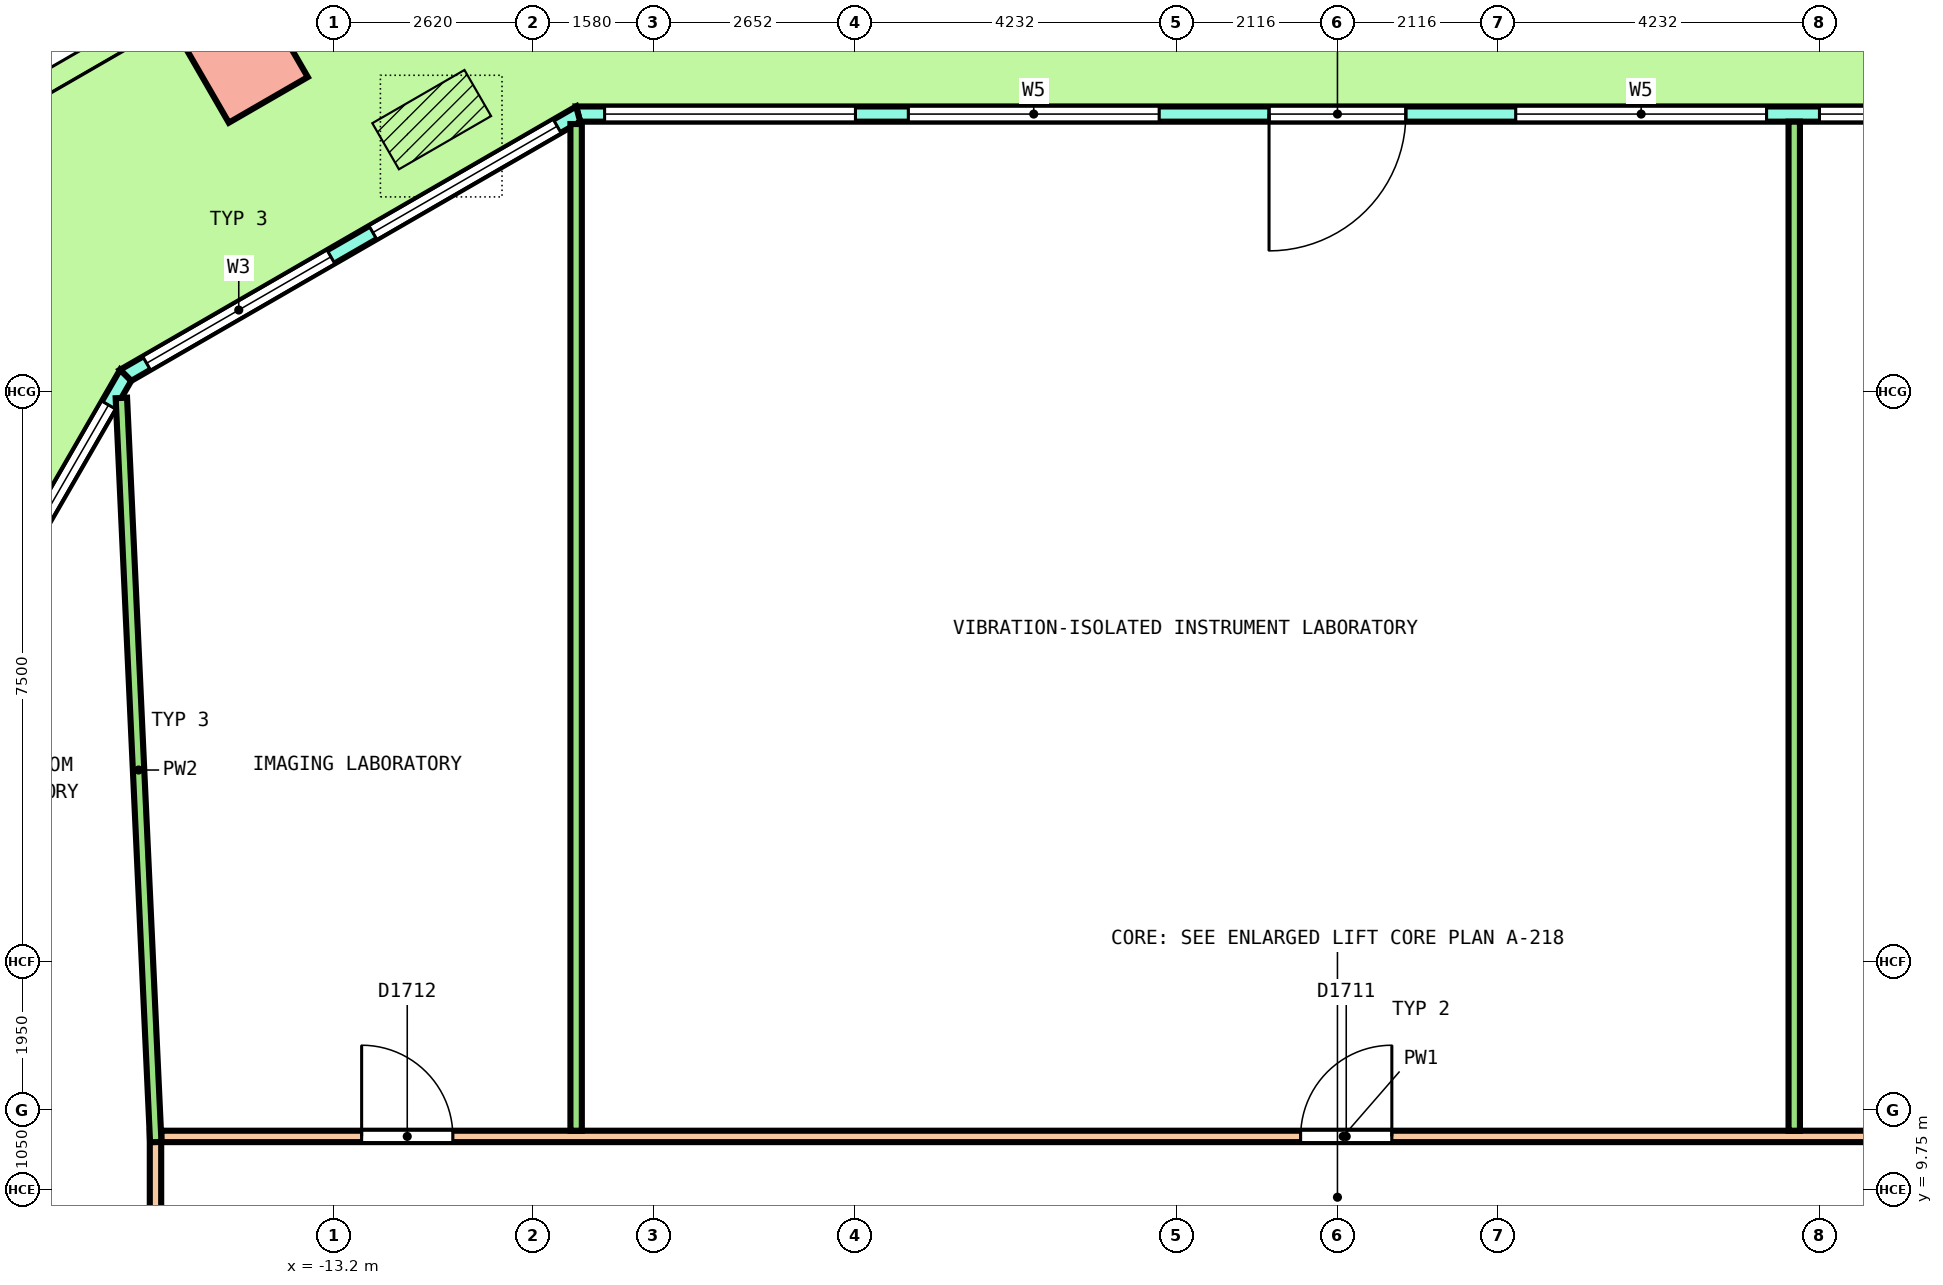
"""IFC4 building model, lengths in metres.
Left out: names, types, materials, properties, quantities, classifications, styles, units other than length and angle.
Written with IfcOpenShell. Run it as: python <this file> out.ifc"""

import sys

from ifc_helpers import new_model, si_unit, direction, frame, frame_2d, origin, origin_2d, place, context, subcontext, project, spatial, polyline, rectangle, outline, extrude, element, fill, save


model = new_model("IFC4")
c1 = context("Model", 3, precision=1e-05, world=origin(), true_north=direction((0.0, 1.0)))
c2 = subcontext(c1, "Body", "Model", "MODEL_VIEW")
j1 = project(units=[si_unit("LENGTHUNIT", "METRE"), si_unit("PLANEANGLEUNIT", "RADIAN")], contexts=[c1])
p1 = place(None, origin())
s1 = spatial("IfcSite", under=j1, at=p1, CompositionType="ELEMENT")
p2 = place(p1, origin())
s2 = spatial("IfcBuilding", under=s1, at=p2, CompositionType="ELEMENT")
p3 = place(p2, frame((0.0, 0.0, 149.6)))
s3 = spatial("IfcBuildingStorey", under=s2, at=p3, CompositionType="ELEMENT", Elevation=149.6)
p4 = place(p3, frame((-14.366, 24.606, 0.0), z_axis=(-0.036207253783, 0.0, 0.999344302417), x_axis=(-0.865315366935, -0.500246354177, -0.031351250032)))
e1 = element("IfcColumn", 1, at=p4, inside=s3, PredefinedType="COLUMN", context=c2, shape_type="SweptSolid", body=[
    extrude(rectangle(XDim=1.2, YDim=1.2, at=origin_2d()), origin(), (0.0, 0.0, 1.0), 4.052),
])
p5 = place(p3, frame((9.989, 23.9, 0.0), z_axis=(0.0, 0.0, 1.0), x_axis=(-1.0, 0.0, 0.0)))
e2 = element("IfcWall", 2, at=p5, inside=s3, PredefinedType="SOLIDWALL", context=c2, shape_type="SweptSolid", body=[
    extrude(outline(polyline([(-0.027, -0.1), (1.028, -0.1), (2.082, -0.1), (3.136, -0.1), (4.19, -0.1), (5.245, -0.1), (6.299, -0.1), (7.354, -0.1), (8.408, -0.1), (9.462, -0.1), (10.516, -0.1), (11.571, -0.1), (12.625, -0.1), (13.679, -0.1), (14.734, -0.1), (15.788, -0.1), (16.842, -0.1), (17.897, -0.1), (18.951, -0.1), (20.005, -0.1), (19.952, 0.1), (18.903, 0.1), (17.854, 0.1), (16.806, 0.1), (15.757, 0.1), (14.708, 0.1), (13.66, 0.1), (12.611, 0.1), (11.562, 0.1), (10.514, 0.1), (9.465, 0.1), (8.416, 0.1), (7.368, 0.1), (6.319, 0.1), (5.27, 0.1), (4.221, 0.1), (3.173, 0.1), (2.124, 0.1), (1.075, 0.1), (0.027, 0.1), (-0.027, -0.1)])), origin(), (0.0, 0.0, 1.0), 4.1),
])
p6 = place(p5, frame((0.348, 0.0, 0.1)))
e3 = element("IfcOpeningElement", 3, at=p6, cuts=e2, PredefinedType="OPENING", context=c2, shape_type="SweptSolid", body=[
    extrude(rectangle(XDim=3.3, YDim=2.9, at=frame_2d((1.65, 1.45))), frame((0.0, 0.11, 0.0), z_axis=(0.0, -1.0, 0.0), x_axis=(1.0, 0.0, 0.0)), (0.0, 0.0, 1.0), 0.22),
])
p7 = place(p5, frame((4.344, 0.0, 0.1)))
e4 = element("IfcOpeningElement", 4, at=p7, cuts=e2, PredefinedType="OPENING", context=c2, shape_type="SweptSolid", body=[
    extrude(rectangle(XDim=3.3, YDim=2.9, at=frame_2d((1.65, 1.45))), frame((0.0, 0.11, 0.0), z_axis=(0.0, -1.0, 0.0), x_axis=(1.0, 0.0, 0.0)), (0.0, 0.0, 1.0), 0.22),
])
p8 = place(p5, frame((9.089, 0.0, 0.0)))
e5 = element("IfcOpeningElement", 5, at=p8, cuts=e2, PredefinedType="OPENING", context=c2, shape_type="SweptSolid", body=[
    extrude(rectangle(XDim=1.8, YDim=2.4, at=frame_2d((0.9, 1.2))), frame((0.0, 0.11, 0.0), z_axis=(0.0, -1.0, 0.0), x_axis=(1.0, 0.0, 0.0)), (0.0, 0.0, 1.0), 0.22),
])
p9 = place(p5, frame((9.089, 0.0, 2.55)))
e6 = element("IfcOpeningElement", 6, at=p9, cuts=e2, PredefinedType="OPENING", context=c2, shape_type="SweptSolid", body=[
    extrude(rectangle(XDim=1.8, YDim=0.45, at=frame_2d((0.9, 0.225))), frame((0.0, 0.11, 0.0), z_axis=(0.0, -1.0, 0.0), x_axis=(1.0, 0.0, 0.0)), (0.0, 0.0, 1.0), 0.22),
])
p10 = place(p5, frame((12.335, 0.0, 0.1)))
e7 = element("IfcOpeningElement", 7, at=p10, cuts=e2, PredefinedType="OPENING", context=c2, shape_type="SweptSolid", body=[
    extrude(rectangle(XDim=3.3, YDim=2.9, at=frame_2d((1.65, 1.45))), frame((0.0, 0.11, 0.0), z_axis=(0.0, -1.0, 0.0), x_axis=(1.0, 0.0, 0.0)), (0.0, 0.0, 1.0), 0.22),
])
p11 = place(p5, frame((16.331, 0.0, 0.1)))
e8 = element("IfcOpeningElement", 8, at=p11, cuts=e2, PredefinedType="OPENING", context=c2, shape_type="SweptSolid", body=[
    extrude(rectangle(XDim=3.3, YDim=2.9, at=frame_2d((1.65, 1.45))), frame((0.0, 0.11, 0.0), z_axis=(0.0, -1.0, 0.0), x_axis=(1.0, 0.0, 0.0)), (0.0, 0.0, 1.0), 0.22),
])
p12 = place(p3, frame((-9.989, 23.9, 0.0), z_axis=(0.0, 0.0, 1.0), x_axis=(-0.866029458321, -0.49999297727, 0.0)))
e9 = element("IfcWall", 9, at=p12, inside=s3, PredefinedType="SOLIDWALL", context=c2, shape_type="SweptSolid", body=[
    extrude(outline(polyline([(-0.027, -0.1), (1.128, -0.1), (2.282, -0.1), (3.437, -0.1), (4.592, -0.1), (5.747, -0.1), (6.901, -0.1), (6.848, 0.1), (5.711, 0.1), (4.574, 0.1), (3.437, 0.1), (2.301, 0.1), (1.164, 0.1), (0.027, 0.1), (-0.027, -0.1)])), origin(), (0.0, 0.0, 1.0), 4.1),
])
p13 = place(p12, frame((0.319, 0.0, 0.1)))
e10 = element("IfcOpeningElement", 10, at=p13, cuts=e9, PredefinedType="OPENING", context=c2, shape_type="SweptSolid", body=[
    extrude(rectangle(XDim=2.8, YDim=2.9, at=frame_2d((1.4, 1.45))), frame((0.0, 0.11, 0.0), z_axis=(0.0, -1.0, 0.0), x_axis=(1.0, 0.0, 0.0)), (0.0, 0.0, 1.0), 0.22),
])
p14 = place(p12, frame((3.756, 0.0, 0.1)))
e11 = element("IfcOpeningElement", 11, at=p14, cuts=e9, PredefinedType="OPENING", context=c2, shape_type="SweptSolid", body=[
    extrude(rectangle(XDim=2.8, YDim=2.9, at=frame_2d((1.4, 1.45))), frame((0.0, 0.11, 0.0), z_axis=(0.0, -1.0, 0.0), x_axis=(1.0, 0.0, 0.0)), (0.0, 0.0, 1.0), 0.22),
])
p15 = place(p3, frame((-15.943, 20.463, 0.0), z_axis=(0.0, 0.0, 1.0), x_axis=(-0.500002434251, -0.866023998365, 0.0)))
e12 = element("IfcWall", 12, at=p15, inside=s3, PredefinedType="SOLIDWALL", context=c2, shape_type="SweptSolid", body=[
    extrude(outline(polyline([(-0.027, -0.1), (1.002, -0.1), (2.031, -0.1), (3.061, -0.1), (4.09, -0.1), (5.119, -0.1), (6.148, -0.1), (7.177, -0.1), (8.206, -0.1), (9.235, -0.1), (10.264, -0.1), (11.293, -0.1), (12.323, -0.1), (13.352, -0.1), (14.381, -0.1), (15.41, -0.1), (16.439, -0.1), (17.468, -0.1), (18.497, -0.1), (19.526, -0.1), (19.473, 0.1), (18.449, 0.1), (17.426, 0.1), (16.402, 0.1), (15.379, 0.1), (14.355, 0.1), (13.332, 0.1), (12.308, 0.1), (11.285, 0.1), (10.261, 0.1), (9.238, 0.1), (8.215, 0.1), (7.191, 0.1), (6.168, 0.1), (5.144, 0.1), (4.121, 0.1), (3.097, 0.1), (2.074, 0.1), (1.05, 0.1), (0.027, 0.1), (-0.027, -0.1)])), origin(), (0.0, 0.0, 1.0), 4.1),
])
p16 = place(p15, frame((0.45, 0.0, 0.1)))
e13 = element("IfcOpeningElement", 13, at=p16, cuts=e12, PredefinedType="OPENING", context=c2, shape_type="SweptSolid", body=[
    extrude(rectangle(XDim=3.0, YDim=2.9, at=frame_2d((1.5, 1.45))), frame((0.0, 0.11, 0.0), z_axis=(0.0, -1.0, 0.0), x_axis=(1.0, 0.0, 0.0)), (0.0, 0.0, 1.0), 0.22),
])
p17 = place(p15, frame((4.35, 0.0, 0.1)))
e14 = element("IfcOpeningElement", 14, at=p17, cuts=e12, PredefinedType="OPENING", context=c2, shape_type="SweptSolid", body=[
    extrude(rectangle(XDim=3.0, YDim=2.9, at=frame_2d((1.5, 1.45))), frame((0.0, 0.11, 0.0), z_axis=(0.0, -1.0, 0.0), x_axis=(1.0, 0.0, 0.0)), (0.0, 0.0, 1.0), 0.22),
])
p18 = place(p15, frame((8.85, 0.0, 0.0)))
e15 = element("IfcOpeningElement", 15, at=p18, cuts=e12, PredefinedType="OPENING", context=c2, shape_type="SweptSolid", body=[
    extrude(rectangle(XDim=1.8, YDim=2.4, at=frame_2d((0.9, 1.2))), frame((0.0, 0.11, 0.0), z_axis=(0.0, -1.0, 0.0), x_axis=(1.0, 0.0, 0.0)), (0.0, 0.0, 1.0), 0.22),
])
p19 = place(p15, frame((8.85, 0.0, 2.55)))
e16 = element("IfcOpeningElement", 16, at=p19, cuts=e12, PredefinedType="OPENING", context=c2, shape_type="SweptSolid", body=[
    extrude(rectangle(XDim=1.8, YDim=0.45, at=frame_2d((0.9, 0.225))), frame((0.0, 0.11, 0.0), z_axis=(0.0, -1.0, 0.0), x_axis=(1.0, 0.0, 0.0)), (0.0, 0.0, 1.0), 0.22),
])
p20 = place(p15, frame((12.15, 0.0, 0.1)))
e17 = element("IfcOpeningElement", 17, at=p20, cuts=e12, PredefinedType="OPENING", context=c2, shape_type="SweptSolid", body=[
    extrude(rectangle(XDim=3.0, YDim=2.9, at=frame_2d((1.5, 1.45))), frame((0.0, 0.11, 0.0), z_axis=(0.0, -1.0, 0.0), x_axis=(1.0, 0.0, 0.0)), (0.0, 0.0, 1.0), 0.22),
])
p21 = place(p15, frame((16.05, 0.0, 0.1)))
e18 = element("IfcOpeningElement", 18, at=p21, cuts=e12, PredefinedType="OPENING", context=c2, shape_type="SweptSolid", body=[
    extrude(rectangle(XDim=3.0, YDim=2.9, at=frame_2d((1.5, 1.45))), frame((0.0, 0.11, 0.0), z_axis=(0.0, -1.0, 0.0), x_axis=(1.0, 0.0, 0.0)), (0.0, 0.0, 1.0), 0.22),
])
p22 = place(p3, frame((-15.475, 10.45, 0.0), z_axis=(0.0, 0.0, 1.0), x_axis=(1.0, 0.0, 0.0)))
e19 = element("IfcWall", 19, at=p22, inside=s3, PredefinedType="PARTITIONING", context=c2, shape_type="SweptSolid", body=[
    extrude(rectangle(XDim=31.1, YDim=0.15, at=frame_2d((15.55, 0.0))), origin(), (0.0, 0.0, 1.0), 3.05),
])
p23 = place(p22, frame((25.665, 0.0, 0.0)))
e20 = element("IfcOpeningElement", 20, at=p23, cuts=e19, PredefinedType="OPENING", context=c2, shape_type="SweptSolid", body=[
    extrude(rectangle(XDim=1.2, YDim=2.1, at=frame_2d((0.6, 1.05))), frame((0.0, 0.085, 0.0), z_axis=(0.0, -1.0, 0.0), x_axis=(1.0, 0.0, 0.0)), (0.0, 0.0, 1.0), 0.17),
])
p24 = place(p22, frame((14.99, 0.0, 0.0)))
e21 = element("IfcOpeningElement", 21, at=p24, cuts=e19, PredefinedType="OPENING", context=c2, shape_type="SweptSolid", body=[
    extrude(rectangle(XDim=1.2, YDim=2.1, at=frame_2d((0.6, 1.05))), frame((0.0, 0.085, 0.0), z_axis=(0.0, -1.0, 0.0), x_axis=(1.0, 0.0, 0.0)), (0.0, 0.0, 1.0), 0.17),
])
p25 = place(p22, frame((2.637, 0.0, 0.0)))
e22 = element("IfcOpeningElement", 22, at=p25, cuts=e19, PredefinedType="OPENING", context=c2, shape_type="SweptSolid", body=[
    extrude(rectangle(XDim=1.2, YDim=2.1, at=frame_2d((0.6, 1.05))), frame((0.0, 0.085, 0.0), z_axis=(0.0, -1.0, 0.0), x_axis=(1.0, 0.0, 0.0)), (0.0, 0.0, 1.0), 0.17),
])
p26 = place(p3, frame((-15.55, -0.669, 0.0), z_axis=(0.0, 0.0, 1.0), x_axis=(0.0, 1.0, 0.0)))
e23 = element("IfcWall", 23, at=p26, inside=s3, PredefinedType="PARTITIONING", context=c2, shape_type="SweptSolid", body=[
    extrude(rectangle(XDim=11.194, YDim=0.15, at=frame_2d((5.597, 0.0))), origin(), (0.0, 0.0, 1.0), 3.05),
])
p27 = place(p26, frame((7.095, 0.0, 0.0)))
e24 = element("IfcOpeningElement", 24, at=p27, cuts=e23, PredefinedType="OPENING", context=c2, shape_type="SweptSolid", body=[
    extrude(rectangle(XDim=1.2, YDim=2.1, at=frame_2d((0.6, 1.05))), frame((0.0, 0.085, 0.0), z_axis=(0.0, -1.0, 0.0), x_axis=(1.0, 0.0, 0.0)), (0.0, 0.0, 1.0), 0.17),
])
p28 = place(p3, frame((6.01, 10.525, 0.0), z_axis=(0.0, 0.0, 1.0), x_axis=(0.0, 1.0, 0.0)))
e25 = element("IfcWall", 25, at=p28, inside=s3, PredefinedType="PARTITIONING", context=c2, shape_type="SweptSolid", body=[
    extrude(rectangle(XDim=13.275, YDim=0.15, at=frame_2d((6.638, 0.0))), origin(), (0.0, 0.0, 1.0), 3.05),
])
p29 = place(p3, frame((-10.016, 10.525, 0.0), z_axis=(0.0, 0.0, 1.0), x_axis=(0.0, 1.0, 0.0)))
e26 = element("IfcWall", 26, at=p29, inside=s3, PredefinedType="PARTITIONING", context=c2, shape_type="SweptSolid", body=[
    extrude(rectangle(XDim=13.244, YDim=0.15, at=frame_2d((6.622, 0.0))), origin(), (0.0, 0.0, 1.0), 3.05),
])
p30 = place(p3, frame((-15.999, 20.166, 0.0), z_axis=(0.0, 0.0, 1.0), x_axis=(0.046182778753, -0.998933006235, 0.0)))
e27 = element("IfcWall", 27, at=p30, inside=s3, PredefinedType="PARTITIONING", context=c2, shape_type="SweptSolid", body=[
    extrude(rectangle(XDim=9.801, YDim=0.15, at=frame_2d((4.9, 0.0))), origin(), (0.0, 0.0, 1.0), 3.05),
])
p31 = place(p6, origin())
e28 = element("IfcWindow", 28, at=p31, inside=s3, PartitioningType="SINGLE_PANEL", PredefinedType="WINDOW", context=c2, shape_type="SweptSolid", body=[
    extrude(rectangle(XDim=3.3, YDim=2.9, at=frame_2d((1.65, 1.45))), frame((0.0, 0.03, 0.0), z_axis=(0.0, -1.0, 0.0), x_axis=(1.0, 0.0, 0.0)), (0.0, 0.0, 1.0), 0.06),
])
fill(e3, e28)
p32 = place(p7, origin())
e29 = element("IfcWindow", 29, at=p32, inside=s3, PartitioningType="SINGLE_PANEL", PredefinedType="WINDOW", context=c2, shape_type="SweptSolid", body=[
    extrude(rectangle(XDim=3.3, YDim=2.9, at=frame_2d((1.65, 1.45))), frame((0.0, 0.03, 0.0), z_axis=(0.0, -1.0, 0.0), x_axis=(1.0, 0.0, 0.0)), (0.0, 0.0, 1.0), 0.06),
])
fill(e4, e29)
p33 = place(p8, origin())
e30 = element("IfcDoor", 30, at=p33, inside=s3, OperationType="DOUBLE_DOOR_SINGLE_SWING", PredefinedType="DOOR", context=c2, shape_type="SweptSolid", body=[
    extrude(rectangle(XDim=1.8, YDim=2.4, at=frame_2d((0.9, 1.2))), frame((0.0, 0.025, 0.0), z_axis=(0.0, -1.0, 0.0), x_axis=(1.0, 0.0, 0.0)), (0.0, 0.0, 1.0), 0.05),
])
fill(e5, e30)
p34 = place(p9, origin())
e31 = element("IfcWindow", 31, at=p34, inside=s3, PartitioningType="SINGLE_PANEL", PredefinedType="WINDOW", context=c2, shape_type="SweptSolid", body=[
    extrude(rectangle(XDim=1.8, YDim=0.45, at=frame_2d((0.9, 0.225))), frame((0.0, 0.03, 0.0), z_axis=(0.0, -1.0, 0.0), x_axis=(1.0, 0.0, 0.0)), (0.0, 0.0, 1.0), 0.06),
])
fill(e6, e31)
p35 = place(p10, origin())
e32 = element("IfcWindow", 32, at=p35, inside=s3, PartitioningType="SINGLE_PANEL", PredefinedType="WINDOW", context=c2, shape_type="SweptSolid", body=[
    extrude(rectangle(XDim=3.3, YDim=2.9, at=frame_2d((1.65, 1.45))), frame((0.0, 0.03, 0.0), z_axis=(0.0, -1.0, 0.0), x_axis=(1.0, 0.0, 0.0)), (0.0, 0.0, 1.0), 0.06),
])
fill(e7, e32)
p36 = place(p11, origin())
e33 = element("IfcWindow", 33, at=p36, inside=s3, PartitioningType="SINGLE_PANEL", PredefinedType="WINDOW", context=c2, shape_type="SweptSolid", body=[
    extrude(rectangle(XDim=3.3, YDim=2.9, at=frame_2d((1.65, 1.45))), frame((0.0, 0.03, 0.0), z_axis=(0.0, -1.0, 0.0), x_axis=(1.0, 0.0, 0.0)), (0.0, 0.0, 1.0), 0.06),
])
fill(e8, e33)
p37 = place(p13, origin())
e34 = element("IfcWindow", 34, at=p37, inside=s3, PartitioningType="SINGLE_PANEL", PredefinedType="WINDOW", context=c2, shape_type="SweptSolid", body=[
    extrude(rectangle(XDim=2.8, YDim=2.9, at=frame_2d((1.4, 1.45))), frame((0.0, 0.03, 0.0), z_axis=(0.0, -1.0, 0.0), x_axis=(1.0, 0.0, 0.0)), (0.0, 0.0, 1.0), 0.06),
])
fill(e10, e34)
p38 = place(p14, origin())
e35 = element("IfcWindow", 35, at=p38, inside=s3, PartitioningType="SINGLE_PANEL", PredefinedType="WINDOW", context=c2, shape_type="SweptSolid", body=[
    extrude(rectangle(XDim=2.8, YDim=2.9, at=frame_2d((1.4, 1.45))), frame((0.0, 0.03, 0.0), z_axis=(0.0, -1.0, 0.0), x_axis=(1.0, 0.0, 0.0)), (0.0, 0.0, 1.0), 0.06),
])
fill(e11, e35)
p39 = place(p16, origin())
e36 = element("IfcWindow", 36, at=p39, inside=s3, PartitioningType="SINGLE_PANEL", PredefinedType="WINDOW", context=c2, shape_type="SweptSolid", body=[
    extrude(rectangle(XDim=3.0, YDim=2.9, at=frame_2d((1.5, 1.45))), frame((0.0, 0.03, 0.0), z_axis=(0.0, -1.0, 0.0), x_axis=(1.0, 0.0, 0.0)), (0.0, 0.0, 1.0), 0.06),
])
fill(e13, e36)
p40 = place(p24, origin())
e37 = element("IfcDoor", 37, at=p40, inside=s3, OperationType="DOUBLE_DOOR_SINGLE_SWING", PredefinedType="DOOR", context=c2, shape_type="SweptSolid", body=[
    extrude(rectangle(XDim=1.2, YDim=2.1, at=frame_2d((0.6, 1.05))), frame((0.0, 0.025, 0.0), z_axis=(0.0, -1.0, 0.0), x_axis=(1.0, 0.0, 0.0)), (0.0, 0.0, 1.0), 0.05),
])
fill(e21, e37)
p41 = place(p25, origin())
e38 = element("IfcDoor", 38, at=p41, inside=s3, OperationType="DOUBLE_DOOR_SINGLE_SWING", PredefinedType="DOOR", context=c2, shape_type="SweptSolid", body=[
    extrude(rectangle(XDim=1.2, YDim=2.1, at=frame_2d((0.6, 1.05))), frame((0.0, 0.025, 0.0), z_axis=(0.0, -1.0, 0.0), x_axis=(1.0, 0.0, 0.0)), (0.0, 0.0, 1.0), 0.05),
])
fill(e22, e38)
save(model, sys.argv[1])
